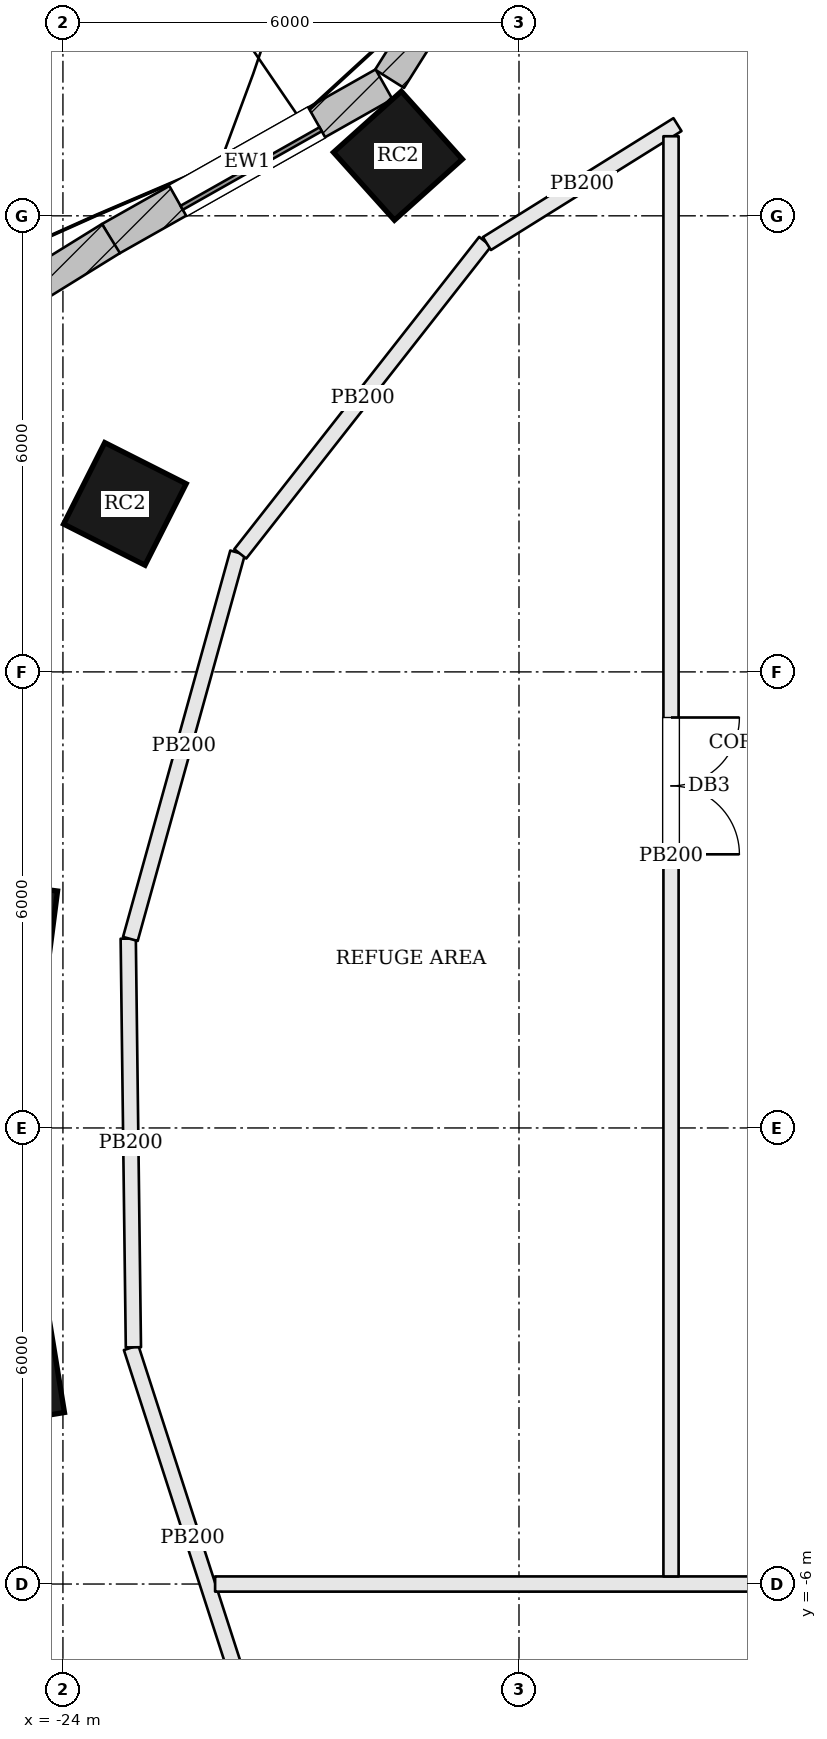
"""IFC4 building model, lengths in metres.
Left out: names, types, materials, properties, quantities, classifications, styles, units other than length and angle.
Written with IfcOpenShell. Run it as: python <this file> out.ifc"""

import sys

from ifc_helpers import new_model, si_unit, direction, frame, frame_2d, origin, origin_2d, place, context, subcontext, project, spatial, rectangle, extrude, element, fill, save


model = new_model("IFC4")
c1 = context("Model", 3, precision=1e-05, world=origin(), true_north=direction((0.0, 1.0)))
c2 = subcontext(c1, "Body", "Model", "MODEL_VIEW")
j1 = project(units=[si_unit("LENGTHUNIT", "METRE"), si_unit("PLANEANGLEUNIT", "RADIAN")], contexts=[c1])
p1 = place(None, origin())
s1 = spatial("IfcSite", under=j1, at=p1, CompositionType="ELEMENT")
p2 = place(p1, origin())
s2 = spatial("IfcBuilding", under=s1, at=p2, CompositionType="ELEMENT")
p3 = place(p2, frame((0.0, 0.0, 106.8)))
s3 = spatial("IfcBuildingStorey", under=s2, at=p3, CompositionType="ELEMENT", Elevation=106.8)
for number, where, z_axis, x_axis in (
    (1, (-19.593, 12.79, 0.0), (0.0, 0.0, 1.0), (-0.744, -0.668, 0.0)),
    (2, (-23.185, 8.21, 0.0), (0.0, 0.0, 1.0), (-0.451, -0.893, 0.0)),
    (3, (-24.743, 2.599, 0.0), (0.0, 0.0, 1.0), (-0.128, -0.992, 0.0)),
    (4, (-24.669, -3.248, 0.0), (0.0, 0.0, 1.0), (0.162, -0.987, 0.0)),
):
    element("IfcColumn", number, at=place(p3, frame(where, z_axis=z_axis, x_axis=x_axis)), inside=s3, PredefinedType="COLUMN", context=c2, shape_type="SweptSolid", body=[
        extrude(rectangle(XDim=1.2, YDim=1.2, at=origin_2d()), origin(), (0.0, 0.0, 1.0), 3.6),
    ])
p4 = place(p3, frame((-16.998, 18.099, 0.0), z_axis=(0.0, 0.0, 1.0), x_axis=(-0.532745661304, -0.846275404559, 0.0)))
e5 = element("IfcWall", 5, at=p4, inside=s3, PredefinedType="SOLIDWALL", context=c2, shape_type="SweptSolid", body=[
    extrude(rectangle(XDim=5.076, YDim=0.45, at=frame_2d((2.538, 0.0))), origin(), (0.0, 0.0, 1.0), 3.4),
])
p5 = place(p4, frame((1.638, 0.0, 0.9)))
e6 = element("IfcOpeningElement", 6, at=p5, cuts=e5, PredefinedType="OPENING", context=c2, shape_type="SweptSolid", body=[
    extrude(rectangle(XDim=1.8, YDim=2.0, at=frame_2d((0.9, 1.0))), frame((0.0, 0.235, 0.0), z_axis=(0.0, -1.0, 0.0), x_axis=(1.0, 0.0, 0.0)), (0.0, 0.0, 1.0), 0.47),
])
p6 = place(p3, frame((-19.776, 13.731, 0.0), z_axis=(0.0, 0.0, 1.0), x_axis=(-0.870610133829, -0.491973571318, 0.0)))
e7 = element("IfcWall", 7, at=p6, inside=s3, PredefinedType="SOLIDWALL", context=c2, shape_type="SweptSolid", body=[
    extrude(rectangle(XDim=4.134, YDim=0.45, at=frame_2d((2.067, 0.0))), origin(), (0.0, 0.0, 1.0), 3.4),
])
p7 = place(p6, frame((1.017, 0.0, 0.9)))
e8 = element("IfcOpeningElement", 8, at=p7, cuts=e7, PredefinedType="OPENING", context=c2, shape_type="SweptSolid", body=[
    extrude(rectangle(XDim=2.1, YDim=2.0, at=frame_2d((1.05, 1.0))), frame((0.0, 0.235, 0.0), z_axis=(0.0, -1.0, 0.0), x_axis=(1.0, 0.0, 0.0)), (0.0, 0.0, 1.0), 0.47),
])
p8 = place(p3, frame((-23.368, 11.701, 0.0), z_axis=(0.0, 0.0, 1.0), x_axis=(-0.850251408633, -0.526376806211, 0.0)))
e9 = element("IfcWall", 9, at=p8, inside=s3, PredefinedType="SOLIDWALL", context=c2, shape_type="SweptSolid", body=[
    extrude(rectangle(XDim=5.302, YDim=0.45, at=frame_2d((2.651, 0.0))), origin(), (0.0, 0.0, 1.0), 3.4),
])
p9 = place(p8, frame((1.601, 0.0, 0.9)))
e10 = element("IfcOpeningElement", 10, at=p9, cuts=e9, PredefinedType="OPENING", context=c2, shape_type="SweptSolid", body=[
    extrude(rectangle(XDim=2.1, YDim=2.0, at=frame_2d((1.05, 1.0))), frame((0.0, 0.235, 0.0), z_axis=(0.0, -1.0, 0.0), x_axis=(1.0, 0.0, 0.0)), (0.0, 0.0, 1.0), 0.47),
])
p10 = place(p3, frame((-21.486, -7.895, 0.0), z_axis=(0.0, 0.0, 1.0), x_axis=(-0.307481575482, 0.951554034587, 0.0)))
e11 = element("IfcWall", 11, at=p10, inside=s3, PredefinedType="PARTITIONING", context=c2, shape_type="SweptSolid", body=[
    extrude(rectangle(XDim=5.259, YDim=0.2, at=frame_2d((2.629, 0.0))), origin(), (0.0, 0.0, 1.0), 3.4),
])
p11 = place(p3, frame((-21.998, -6.0, 0.0), z_axis=(0.0, 0.0, 1.0), x_axis=(1.0, 0.0, 0.0)))
e12 = element("IfcWall", 12, at=p11, inside=s3, PredefinedType="PARTITIONING", context=c2, shape_type="SweptSolid", body=[
    extrude(rectangle(XDim=44.036, YDim=0.2, at=frame_2d((22.018, 0.0))), origin(), (0.0, 0.0, 1.0), 3.4),
])
p12 = place(p11, frame((21.098, 0.0, 0.0)))
e13 = element("IfcOpeningElement", 13, at=p12, cuts=e12, PredefinedType="OPENING", context=c2, shape_type="SweptSolid", body=[
    extrude(rectangle(XDim=1.8, YDim=2.1, at=frame_2d((0.9, 1.05))), frame((0.0, 0.11, 0.0), z_axis=(0.0, -1.0, 0.0), x_axis=(1.0, 0.0, 0.0)), (0.0, 0.0, 1.0), 0.22),
])
p13 = place(p3, frame((-23.073, -2.886, 0.0), z_axis=(0.0, 0.0, 1.0), x_axis=(-0.012666982201, 0.999919770563, 0.0)))
e14 = element("IfcWall", 14, at=p13, inside=s3, PredefinedType="PARTITIONING", context=c2, shape_type="SweptSolid", body=[
    extrude(rectangle(XDim=5.377, YDim=0.2, at=frame_2d((2.689, 0.0))), origin(), (0.0, 0.0, 1.0), 3.4),
])
p14 = place(p3, frame((-23.113, 2.487, 0.0), z_axis=(0.0, 0.0, 1.0), x_axis=(0.267500643582, 0.963557681555, 0.0)))
e15 = element("IfcWall", 15, at=p14, inside=s3, PredefinedType="PARTITIONING", context=c2, shape_type="SweptSolid", body=[
    extrude(rectangle(XDim=5.275, YDim=0.2, at=frame_2d((2.638, 0.0))), origin(), (0.0, 0.0, 1.0), 3.4),
])
p15 = place(p3, frame((-21.667, 7.553, 0.0), z_axis=(0.0, 0.0, 1.0), x_axis=(0.617143909163, 0.786850300491, 0.0)))
e16 = element("IfcWall", 16, at=p15, inside=s3, PredefinedType="PARTITIONING", context=c2, shape_type="SweptSolid", body=[
    extrude(rectangle(XDim=5.221, YDim=0.2, at=frame_2d((2.61, 0.0))), origin(), (0.0, 0.0, 1.0), 3.4),
])
p16 = place(p3, frame((-18.422, 11.635, 0.0), z_axis=(0.0, 0.0, 1.0), x_axis=(0.848299824463, 0.529516201656, 0.0)))
e17 = element("IfcWall", 17, at=p16, inside=s3, PredefinedType="PARTITIONING", context=c2, shape_type="SweptSolid", body=[
    extrude(rectangle(XDim=2.955, YDim=0.2, at=frame_2d((1.478, 0.0))), origin(), (0.0, 0.0, 1.0), 3.4),
])
p17 = place(p3, frame((-16.0, 13.047, 0.0), z_axis=(0.0, 0.0, 1.0), x_axis=(0.0, -1.0, 0.0)))
e18 = element("IfcWall", 18, at=p17, inside=s3, PredefinedType="PARTITIONING", context=c2, shape_type="SweptSolid", body=[
    extrude(rectangle(XDim=18.947, YDim=0.2, at=frame_2d((9.474, 0.0))), origin(), (0.0, 0.0, 1.0), 3.4),
])
p18 = place(p17, frame((7.647, 0.0, 0.0)))
e19 = element("IfcOpeningElement", 19, at=p18, cuts=e18, PredefinedType="OPENING", context=c2, shape_type="SweptSolid", body=[
    extrude(rectangle(XDim=1.8, YDim=2.1, at=frame_2d((0.9, 1.05))), frame((0.0, 0.11, 0.0), z_axis=(0.0, -1.0, 0.0), x_axis=(1.0, 0.0, 0.0)), (0.0, 0.0, 1.0), 0.22),
])
p19 = place(p7, origin())
e20 = element("IfcWindow", 20, at=p19, inside=s3, PartitioningType="SINGLE_PANEL", PredefinedType="WINDOW", context=c2, shape_type="SweptSolid", body=[
    extrude(rectangle(XDim=2.1, YDim=2.0, at=frame_2d((1.05, 1.0))), frame((0.0, 0.135, 0.0), z_axis=(0.0, -1.0, 0.0), x_axis=(1.0, 0.0, 0.0)), (0.0, 0.0, 1.0), 0.06),
])
fill(e8, e20)
p20 = place(p18, origin())
e21 = element("IfcDoor", 21, at=p20, inside=s3, OperationType="DOUBLE_DOOR_SINGLE_SWING", PredefinedType="DOOR", context=c2, shape_type="SweptSolid", body=[
    extrude(rectangle(XDim=1.8, YDim=2.1, at=frame_2d((0.9, 1.05))), frame((0.0, 0.025, 0.0), z_axis=(0.0, -1.0, 0.0), x_axis=(1.0, 0.0, 0.0)), (0.0, 0.0, 1.0), 0.05),
])
fill(e19, e21)
save(model, sys.argv[1])
